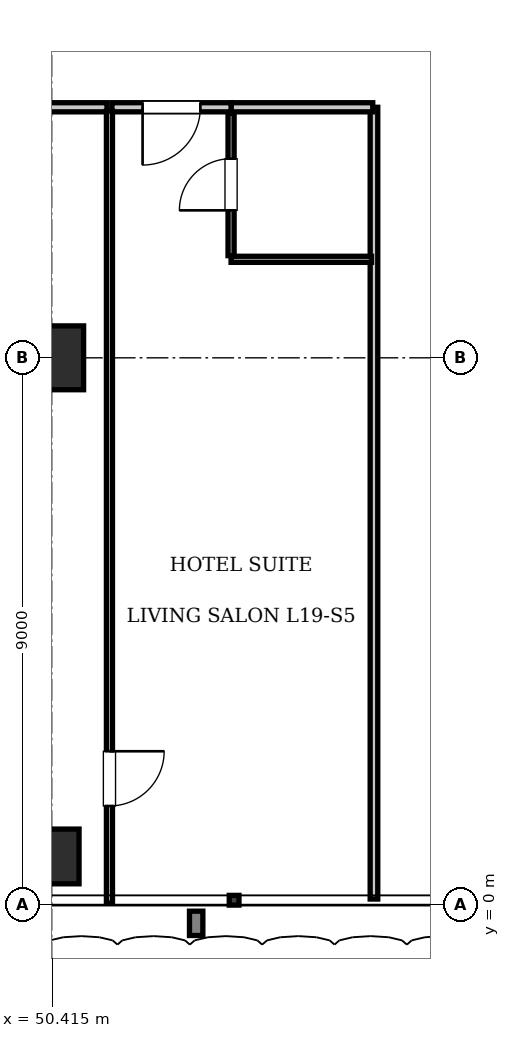
"""IFC4 building model, lengths in metres.
Left out: names, types, materials, properties, quantities, classifications, styles, units other than length and angle.
Written with IfcOpenShell. Run it as: python <this file> out.ifc"""

import sys

from ifc_helpers import new_model, si_unit, direction, frame, frame_2d, origin, origin_2d, place, context, subcontext, project, spatial, rectangle, extrude, element, fill, save


model = new_model("IFC4")
c1 = context("Model", 3, precision=1e-05, world=origin(), true_north=direction((0.0, 1.0)))
c2 = subcontext(c1, "Body", "Model", "MODEL_VIEW")
j1 = project(units=[si_unit("LENGTHUNIT", "METRE"), si_unit("PLANEANGLEUNIT", "RADIAN")], contexts=[c1])
p1 = place(None, origin())
s1 = spatial("IfcSite", under=j1, at=p1, CompositionType="ELEMENT")
p2 = place(p1, origin())
s2 = spatial("IfcBuilding", under=s1, at=p2, CompositionType="ELEMENT")
p3 = place(p2, frame((0.0, 0.0, 80.85)))
s3 = spatial("IfcBuildingStorey", under=s2, at=p3, CompositionType="ELEMENT", Elevation=80.85)
p4 = place(p3, frame((50.4, 9.0, 0.0), z_axis=(0.0, 0.0, 1.0), x_axis=(1.0, 0.0, 0.0)))
e1 = element("IfcColumn", 1, at=p4, inside=s3, PredefinedType="COLUMN", context=c2, shape_type="SweptSolid", body=[
    extrude(rectangle(XDim=1.05, YDim=1.05, at=origin_2d()), origin(), (0.0, 0.0, 1.0), 3.85),
])
p5 = place(p3, frame((50.4, 0.8, 0.0), z_axis=(0.0, 0.0, 1.0), x_axis=(1.0, 0.0, 0.0)))
e2 = element("IfcColumn", 2, at=p5, inside=s3, PredefinedType="COLUMN", context=c2, shape_type="SweptSolid", body=[
    extrude(rectangle(XDim=0.9, YDim=0.9, at=origin_2d()), origin(), (0.0, 0.0, 1.0), 3.85),
])
p6 = place(p3, frame((55.7, 0.1, 0.0), z_axis=(0.0, 0.0, 1.0), x_axis=(0.0, 1.0, 0.0)))
e3 = element("IfcWall", 3, at=p6, inside=s3, PredefinedType="PARTITIONING", context=c2, shape_type="SweptSolid", body=[
    extrude(rectangle(XDim=13.02, YDim=0.125, at=frame_2d((6.51, 0.0))), origin(), (0.0, 0.0, 1.0), 3.61),
])
p7 = place(p3, frame((53.35, 13.12, 0.0), z_axis=(0.0, 0.0, 1.0), x_axis=(1.0, 0.0, 0.0)))
e4 = element("IfcWall", 4, at=p7, inside=s3, PredefinedType="PARTITIONING", context=c2, shape_type="SweptSolid", body=[
    extrude(rectangle(XDim=2.33, YDim=0.15, at=frame_2d((1.165, 0.0))), origin(), (0.0, 0.0, 1.0), 3.61),
])
p8 = place(p3, frame((53.35, 10.62, 0.0), z_axis=(0.0, 0.0, 1.0), x_axis=(1.0, 0.0, 0.0)))
e5 = element("IfcWall", 5, at=p8, inside=s3, PredefinedType="PARTITIONING", context=c2, shape_type="SweptSolid", body=[
    extrude(rectangle(XDim=2.31, YDim=0.1, at=frame_2d((1.155, 0.0))), origin(), (0.0, 0.0, 1.0), 3.61),
])
p9 = place(p3, frame((53.35, 10.68, 0.0), z_axis=(0.0, 0.0, 1.0), x_axis=(0.0, 1.0, 0.0)))
e6 = element("IfcWall", 6, at=p9, inside=s3, PredefinedType="PARTITIONING", context=c2, shape_type="SweptSolid", body=[
    extrude(rectangle(XDim=2.34, YDim=0.1, at=frame_2d((1.17, 0.0))), origin(), (0.0, 0.0, 1.0), 3.61),
])
p10 = place(p9, frame((0.745, 0.0, 0.0)))
e7 = element("IfcOpeningElement", 7, at=p10, cuts=e6, PredefinedType="OPENING", context=c2, shape_type="SweptSolid", body=[
    extrude(rectangle(XDim=0.85, YDim=2.1, at=frame_2d((0.425, 1.05))), frame((0.0, 0.06, 0.0), z_axis=(0.0, -1.0, 0.0), x_axis=(1.0, 0.0, 0.0)), (0.0, 0.0, 1.0), 0.12),
])
p11 = place(p3, frame((48.82, 13.12, 0.0), z_axis=(0.0, 0.0, 1.0), x_axis=(1.0, 0.0, 0.0)))
e8 = element("IfcWall", 8, at=p11, inside=s3, PredefinedType="PARTITIONING", context=c2, shape_type="SweptSolid", body=[
    extrude(rectangle(XDim=2.49, YDim=0.15, at=frame_2d((1.245, 0.0))), origin(), (0.0, 0.0, 1.0), 3.61),
])
p12 = place(p3, frame((51.39, 13.12, 0.0), z_axis=(0.0, 0.0, 1.0), x_axis=(1.0, 0.0, 0.0)))
e9 = element("IfcWall", 9, at=p12, inside=s3, PredefinedType="PARTITIONING", context=c2, shape_type="SweptSolid", body=[
    extrude(rectangle(XDim=1.96, YDim=0.15, at=frame_2d((0.98, 0.0))), origin(), (0.0, 0.0, 1.0), 3.61),
])
p13 = place(p12, frame((0.505, 0.0, 0.0)))
e10 = element("IfcOpeningElement", 10, at=p13, cuts=e9, PredefinedType="OPENING", context=c2, shape_type="SweptSolid", body=[
    extrude(rectangle(XDim=0.95, YDim=2.15, at=frame_2d((0.475, 1.075))), frame((0.0, 0.085, 0.0), z_axis=(0.0, -1.0, 0.0), x_axis=(1.0, 0.0, 0.0)), (0.0, 0.0, 1.0), 0.17),
])
p14 = place(p3, frame((51.35, 0.03, 0.0), z_axis=(0.0, 0.0, 1.0), x_axis=(0.0, 1.0, 0.0)))
e11 = element("IfcWall", 11, at=p14, inside=s3, PredefinedType="PARTITIONING", context=c2, shape_type="SweptSolid", body=[
    extrude(rectangle(XDim=13.03, YDim=0.1, at=frame_2d((6.515, 0.0))), origin(), (0.0, 0.0, 1.0), 3.61),
])
p15 = place(p14, frame((1.6, 0.0, 0.0)))
e12 = element("IfcOpeningElement", 12, at=p15, cuts=e11, PredefinedType="OPENING", context=c2, shape_type="SweptSolid", body=[
    extrude(rectangle(XDim=0.9, YDim=2.1, at=frame_2d((0.45, 1.05))), frame((0.0, 0.06, 0.0), z_axis=(0.0, -1.0, 0.0), x_axis=(1.0, 0.0, 0.0)), (0.0, 0.0, 1.0), 0.12),
])
p16 = place(p10, origin())
e13 = element("IfcDoor", 13, at=p16, inside=s3, OperationType="SINGLE_SWING_LEFT", PredefinedType="DOOR", context=c2, shape_type="SweptSolid", body=[
    extrude(rectangle(XDim=0.85, YDim=2.1, at=frame_2d((0.425, 1.05))), frame((0.0, 0.025, 0.0), z_axis=(0.0, -1.0, 0.0), x_axis=(1.0, 0.0, 0.0)), (0.0, 0.0, 1.0), 0.05),
])
fill(e7, e13)
p17 = place(p13, frame((0.95, 0.0, 0.0), z_axis=(0.0, 0.0, 1.0), x_axis=(-1.0, 0.0, 0.0)))
e14 = element("IfcDoor", 14, at=p17, inside=s3, OperationType="SINGLE_SWING_RIGHT", PredefinedType="DOOR", context=c2, shape_type="SweptSolid", body=[
    extrude(rectangle(XDim=0.95, YDim=2.15, at=frame_2d((0.475, 1.075))), frame((0.0, 0.025, 0.0), z_axis=(0.0, -1.0, 0.0), x_axis=(1.0, 0.0, 0.0)), (0.0, 0.0, 1.0), 0.05),
])
fill(e10, e14)
p18 = place(p15, frame((0.9, 0.0, 0.0), z_axis=(0.0, 0.0, 1.0), x_axis=(-1.0, 0.0, 0.0)))
e15 = element("IfcDoor", 15, at=p18, inside=s3, OperationType="SINGLE_SWING_LEFT", PredefinedType="DOOR", context=c2, shape_type="SweptSolid", body=[
    extrude(rectangle(XDim=0.9, YDim=2.1, at=frame_2d((0.45, 1.05))), frame((0.0, 0.025, 0.0), z_axis=(0.0, -1.0, 0.0), x_axis=(1.0, 0.0, 0.0)), (0.0, 0.0, 1.0), 0.05),
])
fill(e12, e15)
save(model, sys.argv[1])
